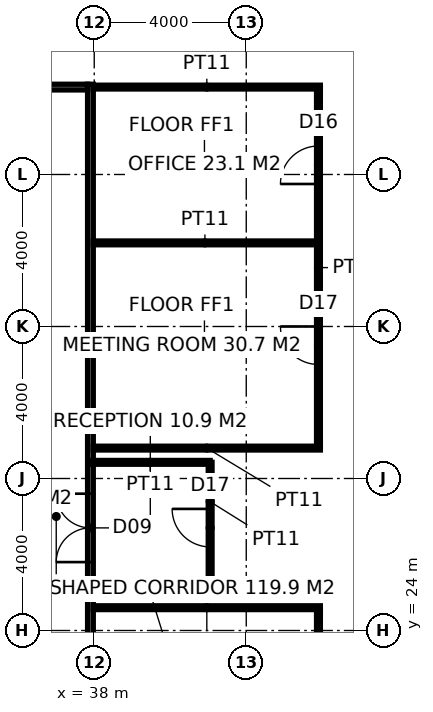
"""IFC4 building model, lengths in metres.
Left out: names, types, materials, properties, quantities, classifications, styles, units other than length and angle.
Written with IfcOpenShell. Run it as: python <this file> out.ifc"""

import sys

from ifc_helpers import new_model, si_unit, direction, frame, frame_2d, origin, place, context, subcontext, project, spatial, rectangle, extrude, element, fill, save


model = new_model("IFC4")
c1 = context("Model", 3, precision=1e-05, world=origin(), true_north=direction((0.0, 1.0)))
c2 = subcontext(c1, "Body", "Model", "MODEL_VIEW")
j1 = project(units=[si_unit("LENGTHUNIT", "METRE"), si_unit("PLANEANGLEUNIT", "RADIAN")], contexts=[c1])
p1 = place(None, origin())
s1 = spatial("IfcSite", under=j1, at=p1, CompositionType="ELEMENT")
p2 = place(p1, origin())
s2 = spatial("IfcBuilding", under=s1, at=p2, CompositionType="ELEMENT")
p3 = place(p2, frame((0.0, 0.0, 109.4)))
s3 = spatial("IfcBuildingStorey", under=s2, at=p3, CompositionType="ELEMENT", Elevation=109.4)
p4 = place(p3, frame((37.9, 15.025, 0.0), z_axis=(0.0, 0.0, 1.0), x_axis=(0.0, 1.0, 0.0)))
e1 = element("IfcWall", 1, at=p4, inside=s3, PredefinedType="PARTITIONING", context=c2, shape_type="SweptSolid", body=[
    extrude(rectangle(XDim=23.35, YDim=0.15, at=frame_2d((11.675, 0.0))), origin(), (0.0, 0.0, 1.0), 2.95),
])
p5 = place(p4, frame((10.775, 0.0, 0.0)))
e2 = element("IfcOpeningElement", 2, at=p5, cuts=e1, PredefinedType="OPENING", context=c2, shape_type="SweptSolid", body=[
    extrude(rectangle(XDim=1.8, YDim=2.4, at=frame_2d((0.9, 1.2))), frame((0.0, 0.085, 0.0), z_axis=(0.0, -1.0, 0.0), x_axis=(1.0, 0.0, 0.0)), (0.0, 0.0, 1.0), 0.17),
])
p6 = place(p3, frame((17.5, 38.3, 0.0), z_axis=(0.0, 0.0, 1.0), x_axis=(1.0, 0.0, 0.0)))
e3 = element("IfcWall", 3, at=p6, inside=s3, PredefinedType="PARTITIONING", context=c2, shape_type="SweptSolid", body=[
    extrude(rectangle(XDim=20.325, YDim=0.15, at=frame_2d((10.163, 0.0))), origin(), (0.0, 0.0, 1.0), 3.85),
])
p7 = place(p6, frame((6.25, 0.0, 0.0)))
e4 = element("IfcOpeningElement", 4, at=p7, cuts=e3, PredefinedType="OPENING", context=c2, shape_type="SweptSolid", body=[
    extrude(rectangle(XDim=0.9, YDim=2.1, at=frame_2d((0.45, 1.05))), frame((0.0, 0.085, 0.0), z_axis=(0.0, -1.0, 0.0), x_axis=(1.0, 0.0, 0.0)), (0.0, 0.0, 1.0), 0.17),
])
p8 = place(p6, frame((10.0, 0.0, 0.0)))
e5 = element("IfcOpeningElement", 5, at=p8, cuts=e3, PredefinedType="OPENING", context=c2, shape_type="SweptSolid", body=[
    extrude(rectangle(XDim=1.0, YDim=2.1, at=frame_2d((0.5, 1.05))), frame((0.0, 0.085, 0.0), z_axis=(0.0, -1.0, 0.0), x_axis=(1.0, 0.0, 0.0)), (0.0, 0.0, 1.0), 0.17),
])
p9 = place(p6, frame((13.85, 0.0, 0.0)))
e6 = element("IfcOpeningElement", 6, at=p9, cuts=e3, PredefinedType="OPENING", context=c2, shape_type="SweptSolid", body=[
    extrude(rectangle(XDim=0.9, YDim=2.1, at=frame_2d((0.45, 1.05))), frame((0.0, 0.085, 0.0), z_axis=(0.0, -1.0, 0.0), x_axis=(1.0, 0.0, 0.0)), (0.0, 0.0, 1.0), 0.17),
])
for number, where, z_axis, x_axis in (
    (7, (37.975, 24.6, 0.0), (0.0, 0.0, 1.0), (1.0, 0.0, 0.0)),
    (8, (37.975, 28.8, 0.0), (0.0, 0.0, 1.0), (1.0, 0.0, 0.0)),
):
    element("IfcWall", number, at=place(p3, frame(where, z_axis=z_axis, x_axis=x_axis)), inside=s3, PredefinedType="PARTITIONING", context=c2, shape_type="SweptSolid", body=[
        extrude(rectangle(XDim=5.975, YDim=0.1, at=frame_2d((2.987, 0.0))), origin(), (0.0, 0.0, 1.0), 3.85),
    ])
p10 = place(p3, frame((37.975, 34.2, 0.0), z_axis=(0.0, 0.0, 1.0), x_axis=(1.0, 0.0, 0.0)))
e9 = element("IfcWall", 9, at=p10, inside=s3, PredefinedType="PARTITIONING", context=c2, shape_type="SweptSolid", body=[
    extrude(rectangle(XDim=5.875, YDim=0.1, at=frame_2d((2.938, 0.0))), origin(), (0.0, 0.0, 1.0), 3.85),
])
p11 = place(p3, frame((37.975, 38.3, 0.0), z_axis=(0.0, 0.0, 1.0), x_axis=(1.0, 0.0, 0.0)))
e10 = element("IfcWall", 10, at=p11, inside=s3, PredefinedType="PARTITIONING", context=c2, shape_type="SweptSolid", body=[
    extrude(rectangle(XDim=5.975, YDim=0.1, at=frame_2d((2.987, 0.0))), origin(), (0.0, 0.0, 1.0), 3.85),
])
p12 = place(p3, frame((43.9, 16.15, 0.0), z_axis=(0.0, 0.0, 1.0), x_axis=(0.0, 1.0, 0.0)))
e11 = element("IfcWall", 11, at=p12, inside=s3, PredefinedType="PARTITIONING", context=c2, shape_type="SweptSolid", body=[
    extrude(rectangle(XDim=8.4, YDim=0.1, at=frame_2d((4.2, 0.0))), origin(), (0.0, 0.0, 1.0), 3.85),
])
p13 = place(p12, frame((3.3, 0.0, 0.0)))
e12 = element("IfcOpeningElement", 12, at=p13, cuts=e11, PredefinedType="OPENING", context=c2, shape_type="SweptSolid", body=[
    extrude(rectangle(XDim=1.8, YDim=2.4, at=frame_2d((0.9, 1.2))), frame((0.0, 0.06, 0.0), z_axis=(0.0, -1.0, 0.0), x_axis=(1.0, 0.0, 0.0)), (0.0, 0.0, 1.0), 0.12),
])
p14 = place(p3, frame((43.9, 28.85, 0.0), z_axis=(0.0, 0.0, 1.0), x_axis=(0.0, 1.0, 0.0)))
e13 = element("IfcWall", 13, at=p14, inside=s3, PredefinedType="PARTITIONING", context=c2, shape_type="SweptSolid", body=[
    extrude(rectangle(XDim=9.4, YDim=0.1, at=frame_2d((4.7, 0.0))), origin(), (0.0, 0.0, 1.0), 3.85),
])
p15 = place(p14, frame((2.15, 0.0, 0.0)))
e14 = element("IfcOpeningElement", 14, at=p15, cuts=e13, PredefinedType="OPENING", context=c2, shape_type="SweptSolid", body=[
    extrude(rectangle(XDim=1.0, YDim=2.2, at=frame_2d((0.5, 1.1))), frame((0.0, 0.06, 0.0), z_axis=(0.0, -1.0, 0.0), x_axis=(1.0, 0.0, 0.0)), (0.0, 0.0, 1.0), 0.12),
])
p16 = place(p14, frame((6.9, 0.0, 0.0)))
e15 = element("IfcOpeningElement", 15, at=p16, cuts=e13, PredefinedType="OPENING", context=c2, shape_type="SweptSolid", body=[
    extrude(rectangle(XDim=1.0, YDim=2.2, at=frame_2d((0.5, 1.1))), frame((0.0, 0.06, 0.0), z_axis=(0.0, -1.0, 0.0), x_axis=(1.0, 0.0, 0.0)), (0.0, 0.0, 1.0), 0.12),
])
p17 = place(p3, frame((37.9, 24.975, 0.0), z_axis=(0.0, 0.0, 1.0), x_axis=(1.0, 0.0, 0.0)))
e16 = element("IfcWall", 16, at=p17, inside=s3, PredefinedType="PARTITIONING", context=c2, shape_type="SweptSolid", body=[
    extrude(rectangle(XDim=3.15, YDim=0.1, at=frame_2d((1.575, 0.0))), origin(), (0.0, 0.0, 1.0), 3.85),
])
p18 = place(p3, frame((41.05, 24.975, 0.0), z_axis=(0.0, 0.0, 1.0), x_axis=(0.0, 1.0, 0.0)))
e17 = element("IfcWall", 17, at=p18, inside=s3, PredefinedType="PARTITIONING", context=c2, shape_type="SweptSolid", body=[
    extrude(rectangle(XDim=3.45, YDim=0.1, at=frame_2d((1.725, 0.0))), origin(), (0.0, 0.0, 1.0), 3.85),
])
p19 = place(p18, frame((1.225, 0.0, 0.0)))
e18 = element("IfcOpeningElement", 18, at=p19, cuts=e17, PredefinedType="OPENING", context=c2, shape_type="SweptSolid", body=[
    extrude(rectangle(XDim=1.0, YDim=2.2, at=frame_2d((0.5, 1.1))), frame((0.0, 0.06, 0.0), z_axis=(0.0, -1.0, 0.0), x_axis=(1.0, 0.0, 0.0)), (0.0, 0.0, 1.0), 0.12),
])
p20 = place(p3, frame((41.05, 28.425, 0.0), z_axis=(0.0, 0.0, 1.0), x_axis=(-1.0, 0.0, 0.0)))
e19 = element("IfcWall", 19, at=p20, inside=s3, PredefinedType="PARTITIONING", context=c2, shape_type="SweptSolid", body=[
    extrude(rectangle(XDim=3.15, YDim=0.1, at=frame_2d((1.575, 0.0))), origin(), (0.0, 0.0, 1.0), 3.85),
])
p21 = place(p5, origin())
e20 = element("IfcDoor", 20, at=p21, inside=s3, OperationType="DOUBLE_DOOR_DOUBLE_SWING", PredefinedType="DOOR", context=c2, shape_type="SweptSolid", body=[
    extrude(rectangle(XDim=1.8, YDim=2.4, at=frame_2d((0.9, 1.2))), frame((0.0, 0.025, 0.0), z_axis=(0.0, -1.0, 0.0), x_axis=(1.0, 0.0, 0.0)), (0.0, 0.0, 1.0), 0.05),
])
fill(e2, e20)
p22 = place(p15, origin())
e21 = element("IfcDoor", 21, at=p22, inside=s3, OperationType="SINGLE_SWING_RIGHT", PredefinedType="DOOR", context=c2, shape_type="SweptSolid", body=[
    extrude(rectangle(XDim=1.0, YDim=2.2, at=frame_2d((0.5, 1.1))), frame((0.0, 0.025, 0.0), z_axis=(0.0, -1.0, 0.0), x_axis=(1.0, 0.0, 0.0)), (0.0, 0.0, 1.0), 0.05),
])
fill(e14, e21)
p23 = place(p16, origin())
e22 = element("IfcDoor", 22, at=p23, inside=s3, OperationType="SINGLE_SWING_LEFT", PredefinedType="DOOR", context=c2, shape_type="SweptSolid", body=[
    extrude(rectangle(XDim=1.0, YDim=2.2, at=frame_2d((0.5, 1.1))), frame((0.0, 0.025, 0.0), z_axis=(0.0, -1.0, 0.0), x_axis=(1.0, 0.0, 0.0)), (0.0, 0.0, 1.0), 0.05),
])
fill(e15, e22)
p24 = place(p19, origin())
e23 = element("IfcDoor", 23, at=p24, inside=s3, OperationType="SINGLE_SWING_RIGHT", PredefinedType="DOOR", context=c2, shape_type="SweptSolid", body=[
    extrude(rectangle(XDim=1.0, YDim=2.2, at=frame_2d((0.5, 1.1))), frame((0.0, 0.025, 0.0), z_axis=(0.0, -1.0, 0.0), x_axis=(1.0, 0.0, 0.0)), (0.0, 0.0, 1.0), 0.05),
])
fill(e18, e23)
save(model, sys.argv[1])
